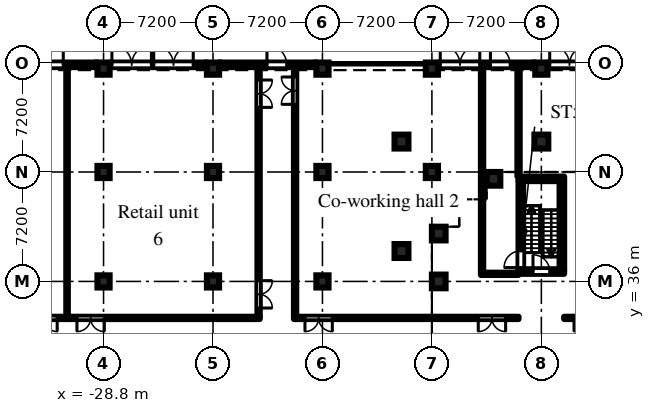
"""IFC4 building model, lengths in metres.
Left out: names, types, materials, properties, quantities, classifications, styles, units other than length and angle.
Written with IfcOpenShell. Run it as: python <this file> out.ifc"""

import sys

from ifc_helpers import new_model, si_unit, direction, frame, frame_2d, origin, origin_2d, place, context, subcontext, project, spatial, rectangle, hollow_circle, extrude, element, fill, save


model = new_model("IFC4")
c1 = context("Model", 3, precision=1e-05, world=origin(), true_north=direction((0.0, 1.0)))
c2 = subcontext(c1, "Body", "Model", "MODEL_VIEW")
j1 = project(units=[si_unit("LENGTHUNIT", "METRE"), si_unit("PLANEANGLEUNIT", "RADIAN")], contexts=[c1])
p1 = place(None, origin())
s1 = spatial("IfcSite", under=j1, at=p1, CompositionType="ELEMENT")
p2 = place(p1, origin())
s2 = spatial("IfcBuilding", under=s1, at=p2, CompositionType="ELEMENT")
p3 = place(p2, origin())
s3 = spatial("IfcBuildingStorey", under=s2, at=p3, CompositionType="ELEMENT", Elevation=0.0)
for number, where, z_axis, x_axis in (
    (1, (-6.75, 36.0, 0.0), (0.0, 0.0, 1.0), (1.0, 0.0, 0.0)),
    (2, (-6.75, 39.15, 0.0), (0.0, 0.0, 1.0), (1.0, 0.0, 0.0)),
    (3, (-3.15, 42.75, 0.0), (0.0, 0.0, 1.0), (1.0, 0.0, 0.0)),
):
    element("IfcColumn", number, at=place(p3, frame(where, z_axis=z_axis, x_axis=x_axis)), inside=s3, PredefinedType="COLUMN", context=c2, shape_type="SweptSolid", body=[
        extrude(rectangle(XDim=0.9, YDim=0.9, at=origin_2d()), origin(), (0.0, 0.0, 1.0), 7.2),
    ])
for number, where, z_axis, x_axis in (
    (4, (-28.8, 36.0, 0.0), (0.0, 0.0, 1.0), (1.0, 0.0, 0.0)),
    (5, (-28.8, 43.2, 0.0), (0.0, 0.0, 1.0), (1.0, 0.0, 0.0)),
    (6, (-28.8, 50.0, 0.0), (0.0, 0.0, 1.0), (1.0, 0.0, 0.0)),
    (7, (-21.6, 36.0, 0.0), (0.0, 0.0, 1.0), (1.0, 0.0, 0.0)),
    (8, (-21.6, 43.2, 0.0), (0.0, 0.0, 1.0), (1.0, 0.0, 0.0)),
    (9, (-21.6, 50.0, 0.0), (0.0, 0.0, 1.0), (1.0, 0.0, 0.0)),
    (10, (-14.4, 36.0, 0.0), (0.0, 0.0, 1.0), (1.0, 0.0, 0.0)),
    (11, (-14.4, 43.2, 0.0), (0.0, 0.0, 1.0), (1.0, 0.0, 0.0)),
    (12, (-14.4, 50.0, 0.0), (0.0, 0.0, 1.0), (1.0, 0.0, 0.0)),
    (13, (-7.2, 43.2, 0.0), (0.0, 0.0, 1.0), (1.0, 0.0, 0.0)),
    (14, (-7.2, 50.0, 0.0), (0.0, 0.0, 1.0), (1.0, 0.0, 0.0)),
    (15, (0.0, 50.0, 0.0), (0.0, 0.0, 1.0), (1.0, 0.0, 0.0)),
):
    element("IfcColumn", number, at=place(p3, frame(where, z_axis=z_axis, x_axis=x_axis)), inside=s3, PredefinedType="COLUMN", context=c2, shape_type="SweptSolid", body=[
        extrude(rectangle(XDim=0.8, YDim=0.8, at=origin_2d()), origin(), (0.0, 0.0, 1.0), 6.6),
    ])
for number, where, z_axis, x_axis in (
    (16, (0.0, 45.2, 0.0), (0.0, 0.0, 1.0), (1.0, 0.0, 0.0)),
    (17, (-9.2, 45.2, 0.0), (0.0, 0.0, 1.0), (1.0, 0.0, 0.0)),
    (18, (-9.2, 38.0, 0.0), (0.0, 0.0, 1.0), (1.0, 0.0, 0.0)),
):
    element("IfcColumn", number, at=place(p3, frame(where, z_axis=z_axis, x_axis=x_axis)), inside=s3, PredefinedType="COLUMN", context=c2, shape_type="SweptSolid", body=[
        extrude(hollow_circle(Radius=0.457, WallThickness=0.05, at=origin_2d()), origin(), (0.0, 0.0, 1.0), 7.5),
    ])
p4 = place(p3, frame((6.8, 50.25, 0.0), z_axis=(0.0, 0.0, 1.0), x_axis=(-1.0, 0.0, 0.0)))
e19 = element("IfcWall", 19, at=p4, inside=s3, PredefinedType="SOLIDWALL", context=c2, shape_type="SweptSolid", body=[
    extrude(rectangle(XDim=6.4, YDim=0.3, at=frame_2d((3.2, 0.0))), origin(), (0.0, 0.0, 1.0), 6.6),
])
p5 = place(p4, frame((3.65, 0.0, 0.0)))
e20 = element("IfcOpeningElement", 20, at=p5, cuts=e19, PredefinedType="OPENING", context=c2, shape_type="SweptSolid", body=[
    extrude(rectangle(XDim=2.6, YDim=2.4, at=frame_2d((1.3, 1.2))), frame((0.0, 0.16, 0.0), z_axis=(0.0, -1.0, 0.0), x_axis=(1.0, 0.0, 0.0)), (0.0, 0.0, 1.0), 0.32),
])
p6 = place(p3, frame((-0.4, 50.25, 0.0), z_axis=(0.0, 0.0, 1.0), x_axis=(-1.0, 0.0, 0.0)))
e21 = element("IfcWall", 21, at=p6, inside=s3, PredefinedType="SOLIDWALL", context=c2, shape_type="SweptSolid", body=[
    extrude(rectangle(XDim=6.4, YDim=0.3, at=frame_2d((3.2, 0.0))), origin(), (0.0, 0.0, 1.0), 6.6),
])
p7 = place(p6, frame((1.65, 0.0, 0.0)))
e22 = element("IfcOpeningElement", 22, at=p7, cuts=e21, PredefinedType="OPENING", context=c2, shape_type="SweptSolid", body=[
    extrude(rectangle(XDim=1.3, YDim=2.1, at=frame_2d((0.65, 1.05))), frame((0.0, 0.16, 0.0), z_axis=(0.0, -1.0, 0.0), x_axis=(1.0, 0.0, 0.0)), (0.0, 0.0, 1.0), 0.32),
])
p8 = place(p6, frame((3.65, 0.0, 0.0)))
e23 = element("IfcOpeningElement", 23, at=p8, cuts=e21, PredefinedType="OPENING", context=c2, shape_type="SweptSolid", body=[
    extrude(rectangle(XDim=2.6, YDim=2.4, at=frame_2d((1.3, 1.2))), frame((0.0, 0.16, 0.0), z_axis=(0.0, -1.0, 0.0), x_axis=(1.0, 0.0, 0.0)), (0.0, 0.0, 1.0), 0.32),
])
p9 = place(p3, frame((-14.8, 50.25, 0.0), z_axis=(0.0, 0.0, 1.0), x_axis=(-1.0, 0.0, 0.0)))
e24 = element("IfcWall", 24, at=p9, inside=s3, PredefinedType="SOLIDWALL", context=c2, shape_type="SweptSolid", body=[
    extrude(rectangle(XDim=6.4, YDim=0.3, at=frame_2d((3.2, 0.0))), origin(), (0.0, 0.0, 1.0), 6.6),
])
p10 = place(p9, frame((1.95, 0.0, 0.0)))
e25 = element("IfcOpeningElement", 25, at=p10, cuts=e24, PredefinedType="OPENING", context=c2, shape_type="SweptSolid", body=[
    extrude(rectangle(XDim=1.3, YDim=2.1, at=frame_2d((0.65, 1.05))), frame((0.0, 0.16, 0.0), z_axis=(0.0, -1.0, 0.0), x_axis=(1.0, 0.0, 0.0)), (0.0, 0.0, 1.0), 0.32),
])
p11 = place(p3, frame((-22.0, 50.25, 0.0), z_axis=(0.0, 0.0, 1.0), x_axis=(-1.0, 0.0, 0.0)))
e26 = element("IfcWall", 26, at=p11, inside=s3, PredefinedType="SOLIDWALL", context=c2, shape_type="SweptSolid", body=[
    extrude(rectangle(XDim=6.4, YDim=0.3, at=frame_2d((3.2, 0.0))), origin(), (0.0, 0.0, 1.0), 6.6),
])
p12 = place(p11, frame((0.9, 0.0, 0.0)))
e27 = element("IfcOpeningElement", 27, at=p12, cuts=e26, PredefinedType="OPENING", context=c2, shape_type="SweptSolid", body=[
    extrude(rectangle(XDim=2.6, YDim=2.4, at=frame_2d((1.3, 1.2))), frame((0.0, 0.16, 0.0), z_axis=(0.0, -1.0, 0.0), x_axis=(1.0, 0.0, 0.0)), (0.0, 0.0, 1.0), 0.32),
])
p13 = place(p11, frame((3.65, 0.0, 0.0)))
e28 = element("IfcOpeningElement", 28, at=p13, cuts=e26, PredefinedType="OPENING", context=c2, shape_type="SweptSolid", body=[
    extrude(rectangle(XDim=2.6, YDim=2.4, at=frame_2d((1.3, 1.2))), frame((0.0, 0.16, 0.0), z_axis=(0.0, -1.0, 0.0), x_axis=(1.0, 0.0, 0.0)), (0.0, 0.0, 1.0), 0.32),
])
p14 = place(p3, frame((-29.2, 50.25, 0.0), z_axis=(0.0, 0.0, 1.0), x_axis=(-1.0, 0.0, 0.0)))
e29 = element("IfcWall", 29, at=p14, inside=s3, PredefinedType="SOLIDWALL", context=c2, shape_type="SweptSolid", body=[
    extrude(rectangle(XDim=6.4, YDim=0.3, at=frame_2d((3.2, 0.0))), origin(), (0.0, 0.0, 1.0), 6.6),
])
p15 = place(p14, frame((2.25, 0.0, 0.0)))
e30 = element("IfcOpeningElement", 30, at=p15, cuts=e29, PredefinedType="OPENING", context=c2, shape_type="SweptSolid", body=[
    extrude(rectangle(XDim=2.6, YDim=2.4, at=frame_2d((1.3, 1.2))), frame((0.0, 0.16, 0.0), z_axis=(0.0, -1.0, 0.0), x_axis=(1.0, 0.0, 0.0)), (0.0, 0.0, 1.0), 0.32),
])
p16 = place(p3, frame((-1.5, 36.65, 0.0), z_axis=(0.0, 0.0, 1.0), x_axis=(1.0, 0.0, 0.0)))
e31 = element("IfcWall", 31, at=p16, inside=s3, PredefinedType="SHEAR", context=c2, shape_type="SweptSolid", body=[
    extrude(rectangle(XDim=3.0, YDim=0.3, at=frame_2d((1.5, 0.0))), origin(), (0.0, 0.0, 1.0), 6.6),
])
p17 = place(p16, frame((0.95, 0.0, 0.0)))
e32 = element("IfcOpeningElement", 32, at=p17, cuts=e31, PredefinedType="OPENING", context=c2, shape_type="SweptSolid", body=[
    extrude(rectangle(XDim=1.1, YDim=2.1, at=frame_2d((0.55, 1.05))), frame((0.0, 0.16, 0.0), z_axis=(0.0, -1.0, 0.0), x_axis=(1.0, 0.0, 0.0)), (0.0, 0.0, 1.0), 0.32),
])
p18 = place(p3, frame((-1.5, 42.75, 0.0), z_axis=(0.0, 0.0, 1.0), x_axis=(1.0, 0.0, 0.0)))
e33 = element("IfcWall", 33, at=p18, inside=s3, PredefinedType="SHEAR", context=c2, shape_type="SweptSolid", body=[
    extrude(rectangle(XDim=3.0, YDim=0.3, at=frame_2d((1.5, 0.0))), origin(), (0.0, 0.0, 1.0), 6.6),
])
p19 = place(p3, frame((-1.35, 36.8, 0.0), z_axis=(0.0, 0.0, 1.0), x_axis=(0.0, 1.0, 0.0)))
e34 = element("IfcWall", 34, at=p19, inside=s3, PredefinedType="SHEAR", context=c2, shape_type="SweptSolid", body=[
    extrude(rectangle(XDim=5.8, YDim=0.3, at=frame_2d((2.9, 0.0))), origin(), (0.0, 0.0, 1.0), 6.6),
])
p20 = place(p19, frame((0.11, 0.0, 0.0)))
e35 = element("IfcOpeningElement", 35, at=p20, cuts=e34, PredefinedType="OPENING", context=c2, shape_type="SweptSolid", body=[
    extrude(rectangle(XDim=1.1, YDim=2.1, at=frame_2d((0.55, 1.05))), frame((0.0, 0.16, 0.0), z_axis=(0.0, -1.0, 0.0), x_axis=(1.0, 0.0, 0.0)), (0.0, 0.0, 1.0), 0.32),
])
p21 = place(p3, frame((1.35, 36.8, 0.0), z_axis=(0.0, 0.0, 1.0), x_axis=(0.0, 1.0, 0.0)))
e36 = element("IfcWall", 36, at=p21, inside=s3, PredefinedType="SHEAR", context=c2, shape_type="SweptSolid", body=[
    extrude(rectangle(XDim=5.8, YDim=0.3, at=frame_2d((2.9, 0.0))), origin(), (0.0, 0.0, 1.0), 6.6),
])
p22 = place(p3, frame((-50.22, 33.6, 0.0), z_axis=(0.0, 0.0, 1.0), x_axis=(1.0, 0.0, 0.0)))
e37 = element("IfcWall", 37, at=p22, inside=s3, PredefinedType="PARTITIONING", context=c2, shape_type="SweptSolid", body=[
    extrude(rectangle(XDim=31.695, YDim=0.15, at=frame_2d((15.848, 0.0))), origin(), (0.0, 0.0, 1.0), 6.6),
])
p23 = place(p22, frame((0.67, 0.0, 0.0)))
e38 = element("IfcOpeningElement", 38, at=p23, cuts=e37, PredefinedType="OPENING", context=c2, shape_type="SweptSolid", body=[
    extrude(rectangle(XDim=2.4, YDim=2.1, at=frame_2d((1.2, 1.05))), frame((0.0, 0.085, 0.0), z_axis=(0.0, -1.0, 0.0), x_axis=(1.0, 0.0, 0.0)), (0.0, 0.0, 1.0), 0.17),
])
p24 = place(p22, frame((19.67, 0.0, 0.0)))
e39 = element("IfcOpeningElement", 39, at=p24, cuts=e37, PredefinedType="OPENING", context=c2, shape_type="SweptSolid", body=[
    extrude(rectangle(XDim=1.8, YDim=2.1, at=frame_2d((0.9, 1.05))), frame((0.0, 0.085, 0.0), z_axis=(0.0, -1.0, 0.0), x_axis=(1.0, 0.0, 0.0)), (0.0, 0.0, 1.0), 0.17),
])
p25 = place(p22, frame((4.27, 0.0, 0.0)))
e40 = element("IfcOpeningElement", 40, at=p25, cuts=e37, PredefinedType="OPENING", context=c2, shape_type="SweptSolid", body=[
    extrude(rectangle(XDim=1.8, YDim=2.1, at=frame_2d((0.9, 1.05))), frame((0.0, 0.085, 0.0), z_axis=(0.0, -1.0, 0.0), x_axis=(1.0, 0.0, 0.0)), (0.0, 0.0, 1.0), 0.17),
])
p26 = place(p22, frame((16.57, 0.0, 0.0)))
e41 = element("IfcOpeningElement", 41, at=p26, cuts=e37, PredefinedType="OPENING", context=c2, shape_type="SweptSolid", body=[
    extrude(rectangle(XDim=1.8, YDim=2.1, at=frame_2d((0.9, 1.05))), frame((0.0, 0.085, 0.0), z_axis=(0.0, -1.0, 0.0), x_axis=(1.0, 0.0, 0.0)), (0.0, 0.0, 1.0), 0.17),
])
p27 = place(p3, frame((-31.2, 33.675, 0.0), z_axis=(0.0, 0.0, 1.0), x_axis=(0.0, 1.0, 0.0)))
e42 = element("IfcWall", 42, at=p27, inside=s3, PredefinedType="PARTITIONING", context=c2, shape_type="SweptSolid", body=[
    extrude(rectangle(XDim=16.545, YDim=0.1, at=frame_2d((8.272, 0.0))), origin(), (0.0, 0.0, 1.0), 6.6),
])
p28 = place(p3, frame((-18.6, 33.675, 0.0), z_axis=(0.0, 0.0, 1.0), x_axis=(0.0, 1.0, 0.0)))
e43 = element("IfcWall", 43, at=p28, inside=s3, PredefinedType="PARTITIONING", context=c2, shape_type="SweptSolid", body=[
    extrude(rectangle(XDim=16.545, YDim=0.15, at=frame_2d((8.272, 0.0))), origin(), (0.0, 0.0, 1.0), 6.6),
])
p29 = place(p28, frame((0.575, 0.0, 0.0)))
e44 = element("IfcOpeningElement", 44, at=p29, cuts=e43, PredefinedType="OPENING", context=c2, shape_type="SweptSolid", body=[
    extrude(rectangle(XDim=1.8, YDim=2.1, at=frame_2d((0.9, 1.05))), frame((0.0, 0.085, 0.0), z_axis=(0.0, -1.0, 0.0), x_axis=(1.0, 0.0, 0.0)), (0.0, 0.0, 1.0), 0.17),
])
p30 = place(p28, frame((13.775, 0.0, 0.0)))
e45 = element("IfcOpeningElement", 45, at=p30, cuts=e43, PredefinedType="OPENING", context=c2, shape_type="SweptSolid", body=[
    extrude(rectangle(XDim=1.8, YDim=2.1, at=frame_2d((0.9, 1.05))), frame((0.0, 0.085, 0.0), z_axis=(0.0, -1.0, 0.0), x_axis=(1.0, 0.0, 0.0)), (0.0, 0.0, 1.0), 0.17),
])
p31 = place(p3, frame((-16.2, 33.525, 0.0), z_axis=(0.0, 0.0, 1.0), x_axis=(0.0, 1.0, 0.0)))
e46 = element("IfcWall", 46, at=p31, inside=s3, PredefinedType="PARTITIONING", context=c2, shape_type="SweptSolid", body=[
    extrude(rectangle(XDim=16.695, YDim=0.15, at=frame_2d((8.348, 0.0))), origin(), (0.0, 0.0, 1.0), 6.6),
])
p32 = place(p31, frame((14.125, 0.0, 0.0)))
e47 = element("IfcOpeningElement", 47, at=p32, cuts=e46, PredefinedType="OPENING", context=c2, shape_type="SweptSolid", body=[
    extrude(rectangle(XDim=1.8, YDim=2.1, at=frame_2d((0.9, 1.05))), frame((0.0, 0.085, 0.0), z_axis=(0.0, -1.0, 0.0), x_axis=(1.0, 0.0, 0.0)), (0.0, 0.0, 1.0), 0.17),
])
p33 = place(p3, frame((-16.125, 33.6, 0.0), z_axis=(0.0, 0.0, 1.0), x_axis=(1.0, 0.0, 0.0)))
e48 = element("IfcWall", 48, at=p33, inside=s3, PredefinedType="PARTITIONING", context=c2, shape_type="SweptSolid", body=[
    extrude(rectangle(XDim=14.625, YDim=0.15, at=frame_2d((7.312, 0.0))), origin(), (0.0, 0.0, 1.0), 6.6),
])
p34 = place(p33, frame((0.575, 0.0, 0.0)))
e49 = element("IfcOpeningElement", 49, at=p34, cuts=e48, PredefinedType="OPENING", context=c2, shape_type="SweptSolid", body=[
    extrude(rectangle(XDim=1.8, YDim=2.1, at=frame_2d((0.9, 1.05))), frame((0.0, 0.085, 0.0), z_axis=(0.0, -1.0, 0.0), x_axis=(1.0, 0.0, 0.0)), (0.0, 0.0, 1.0), 0.17),
])
p35 = place(p33, frame((11.975, 0.0, 0.0)))
e50 = element("IfcOpeningElement", 50, at=p35, cuts=e48, PredefinedType="OPENING", context=c2, shape_type="SweptSolid", body=[
    extrude(rectangle(XDim=1.8, YDim=2.1, at=frame_2d((0.9, 1.05))), frame((0.0, 0.085, 0.0), z_axis=(0.0, -1.0, 0.0), x_axis=(1.0, 0.0, 0.0)), (0.0, 0.0, 1.0), 0.17),
])
p36 = place(p3, frame((-3.9, 36.425, 0.0), z_axis=(0.0, 0.0, 1.0), x_axis=(0.0, 1.0, 0.0)))
e51 = element("IfcWall", 51, at=p36, inside=s3, PredefinedType="PARTITIONING", context=c2, shape_type="SweptSolid", body=[
    extrude(rectangle(XDim=13.795, YDim=0.15, at=frame_2d((6.897, 0.0))), origin(), (0.0, 0.0, 1.0), 6.6),
])
p37 = place(p3, frame((-3.825, 36.5, 0.0), z_axis=(0.0, 0.0, 1.0), x_axis=(1.0, 0.0, 0.0)))
e52 = element("IfcWall", 52, at=p37, inside=s3, PredefinedType="PARTITIONING", context=c2, shape_type="SweptSolid", body=[
    extrude(rectangle(XDim=2.325, YDim=0.15, at=frame_2d((1.163, 0.0))), origin(), (0.0, 0.0, 1.0), 6.6),
])
p38 = place(p3, frame((-1.5, 42.9, 0.0), z_axis=(0.0, 0.0, 1.0), x_axis=(0.0, 1.0, 0.0)))
e53 = element("IfcWall", 53, at=p38, inside=s3, PredefinedType="PARTITIONING", context=c2, shape_type="SweptSolid", body=[
    extrude(rectangle(XDim=7.32, YDim=0.15, at=frame_2d((3.66, 0.0))), origin(), (0.0, 0.0, 1.0), 6.6),
])
p39 = place(p3, frame((1.5, 33.6, 0.0), z_axis=(0.0, 0.0, 1.0), x_axis=(1.0, 0.0, 0.0)))
e54 = element("IfcWall", 54, at=p39, inside=s3, PredefinedType="PARTITIONING", context=c2, shape_type="SweptSolid", body=[
    extrude(rectangle(XDim=14.625, YDim=0.15, at=frame_2d((7.312, 0.0))), origin(), (0.0, 0.0, 1.0), 6.6),
])
p40 = place(p39, frame((0.65, 0.0, 0.0)))
e55 = element("IfcOpeningElement", 55, at=p40, cuts=e54, PredefinedType="OPENING", context=c2, shape_type="SweptSolid", body=[
    extrude(rectangle(XDim=1.8, YDim=2.1, at=frame_2d((0.9, 1.05))), frame((0.0, 0.085, 0.0), z_axis=(0.0, -1.0, 0.0), x_axis=(1.0, 0.0, 0.0)), (0.0, 0.0, 1.0), 0.17),
])
p41 = place(p5, frame((2.6, 0.0, 0.0), z_axis=(0.0, 0.0, 1.0), x_axis=(-1.0, 0.0, 0.0)))
e56 = element("IfcDoor", 56, at=p41, inside=s3, OperationType="DOUBLE_DOOR_DOUBLE_SWING", PredefinedType="DOOR", context=c2, shape_type="SweptSolid", body=[
    extrude(rectangle(XDim=2.6, YDim=2.4, at=frame_2d((1.3, 1.2))), frame((0.0, 0.025, 0.0), z_axis=(0.0, -1.0, 0.0), x_axis=(1.0, 0.0, 0.0)), (0.0, 0.0, 1.0), 0.05),
])
fill(e20, e56)
p42 = place(p7, frame((1.3, 0.0, 0.0), z_axis=(0.0, 0.0, 1.0), x_axis=(-1.0, 0.0, 0.0)))
e57 = element("IfcDoor", 57, at=p42, inside=s3, OperationType="SINGLE_SWING_LEFT", PredefinedType="DOOR", context=c2, shape_type="SweptSolid", body=[
    extrude(rectangle(XDim=1.3, YDim=2.1, at=frame_2d((0.65, 1.05))), frame((0.0, 0.025, 0.0), z_axis=(0.0, -1.0, 0.0), x_axis=(1.0, 0.0, 0.0)), (0.0, 0.0, 1.0), 0.05),
])
fill(e22, e57)
p43 = place(p8, frame((2.6, 0.0, 0.0), z_axis=(0.0, 0.0, 1.0), x_axis=(-1.0, 0.0, 0.0)))
e58 = element("IfcDoor", 58, at=p43, inside=s3, OperationType="DOUBLE_DOOR_DOUBLE_SWING", PredefinedType="DOOR", context=c2, shape_type="SweptSolid", body=[
    extrude(rectangle(XDim=2.6, YDim=2.4, at=frame_2d((1.3, 1.2))), frame((0.0, 0.025, 0.0), z_axis=(0.0, -1.0, 0.0), x_axis=(1.0, 0.0, 0.0)), (0.0, 0.0, 1.0), 0.05),
])
fill(e23, e58)
p44 = place(p10, frame((1.3, 0.0, 0.0), z_axis=(0.0, 0.0, 1.0), x_axis=(-1.0, 0.0, 0.0)))
e59 = element("IfcDoor", 59, at=p44, inside=s3, OperationType="SINGLE_SWING_LEFT", PredefinedType="DOOR", context=c2, shape_type="SweptSolid", body=[
    extrude(rectangle(XDim=1.3, YDim=2.1, at=frame_2d((0.65, 1.05))), frame((0.0, 0.025, 0.0), z_axis=(0.0, -1.0, 0.0), x_axis=(1.0, 0.0, 0.0)), (0.0, 0.0, 1.0), 0.05),
])
fill(e25, e59)
p45 = place(p12, frame((2.6, 0.0, 0.0), z_axis=(0.0, 0.0, 1.0), x_axis=(-1.0, 0.0, 0.0)))
e60 = element("IfcDoor", 60, at=p45, inside=s3, OperationType="DOUBLE_DOOR_DOUBLE_SWING", PredefinedType="DOOR", context=c2, shape_type="SweptSolid", body=[
    extrude(rectangle(XDim=2.6, YDim=2.4, at=frame_2d((1.3, 1.2))), frame((0.0, 0.025, 0.0), z_axis=(0.0, -1.0, 0.0), x_axis=(1.0, 0.0, 0.0)), (0.0, 0.0, 1.0), 0.05),
])
fill(e27, e60)
p46 = place(p13, frame((2.6, 0.0, 0.0), z_axis=(0.0, 0.0, 1.0), x_axis=(-1.0, 0.0, 0.0)))
e61 = element("IfcDoor", 61, at=p46, inside=s3, OperationType="DOUBLE_DOOR_DOUBLE_SWING", PredefinedType="DOOR", context=c2, shape_type="SweptSolid", body=[
    extrude(rectangle(XDim=2.6, YDim=2.4, at=frame_2d((1.3, 1.2))), frame((0.0, 0.025, 0.0), z_axis=(0.0, -1.0, 0.0), x_axis=(1.0, 0.0, 0.0)), (0.0, 0.0, 1.0), 0.05),
])
fill(e28, e61)
p47 = place(p15, frame((2.6, 0.0, 0.0), z_axis=(0.0, 0.0, 1.0), x_axis=(-1.0, 0.0, 0.0)))
e62 = element("IfcDoor", 62, at=p47, inside=s3, OperationType="DOUBLE_DOOR_DOUBLE_SWING", PredefinedType="DOOR", context=c2, shape_type="SweptSolid", body=[
    extrude(rectangle(XDim=2.6, YDim=2.4, at=frame_2d((1.3, 1.2))), frame((0.0, 0.025, 0.0), z_axis=(0.0, -1.0, 0.0), x_axis=(1.0, 0.0, 0.0)), (0.0, 0.0, 1.0), 0.05),
])
fill(e30, e62)
p48 = place(p17, origin())
e63 = element("IfcDoor", 63, at=p48, inside=s3, OperationType="SINGLE_SWING_LEFT", PredefinedType="DOOR", context=c2, shape_type="SweptSolid", body=[
    extrude(rectangle(XDim=1.1, YDim=2.1, at=frame_2d((0.55, 1.05))), frame((0.0, 0.025, 0.0), z_axis=(0.0, -1.0, 0.0), x_axis=(1.0, 0.0, 0.0)), (0.0, 0.0, 1.0), 0.05),
])
fill(e32, e63)
p49 = place(p20, origin())
e64 = element("IfcDoor", 64, at=p49, inside=s3, OperationType="SINGLE_SWING_LEFT", PredefinedType="DOOR", context=c2, shape_type="SweptSolid", body=[
    extrude(rectangle(XDim=1.1, YDim=2.1, at=frame_2d((0.55, 1.05))), frame((0.0, 0.025, 0.0), z_axis=(0.0, -1.0, 0.0), x_axis=(1.0, 0.0, 0.0)), (0.0, 0.0, 1.0), 0.05),
])
fill(e35, e64)
p50 = place(p40, frame((1.8, 0.0, 0.0), z_axis=(0.0, 0.0, 1.0), x_axis=(-1.0, 0.0, 0.0)))
e65 = element("IfcDoor", 65, at=p50, inside=s3, OperationType="DOUBLE_DOOR_DOUBLE_SWING", PredefinedType="DOOR", context=c2, shape_type="SweptSolid", body=[
    extrude(rectangle(XDim=1.8, YDim=2.1, at=frame_2d((0.9, 1.05))), frame((0.0, 0.025, 0.0), z_axis=(0.0, -1.0, 0.0), x_axis=(1.0, 0.0, 0.0)), (0.0, 0.0, 1.0), 0.05),
])
fill(e55, e65)
p51 = place(p32, origin())
e66 = element("IfcDoor", 66, at=p51, inside=s3, OperationType="DOUBLE_DOOR_DOUBLE_SWING", PredefinedType="DOOR", context=c2, shape_type="SweptSolid", body=[
    extrude(rectangle(XDim=1.8, YDim=2.1, at=frame_2d((0.9, 1.05))), frame((0.0, 0.025, 0.0), z_axis=(0.0, -1.0, 0.0), x_axis=(1.0, 0.0, 0.0)), (0.0, 0.0, 1.0), 0.05),
])
fill(e47, e66)
p52 = place(p34, frame((1.8, 0.0, 0.0), z_axis=(0.0, 0.0, 1.0), x_axis=(-1.0, 0.0, 0.0)))
e67 = element("IfcDoor", 67, at=p52, inside=s3, OperationType="DOUBLE_DOOR_DOUBLE_SWING", PredefinedType="DOOR", context=c2, shape_type="SweptSolid", body=[
    extrude(rectangle(XDim=1.8, YDim=2.1, at=frame_2d((0.9, 1.05))), frame((0.0, 0.025, 0.0), z_axis=(0.0, -1.0, 0.0), x_axis=(1.0, 0.0, 0.0)), (0.0, 0.0, 1.0), 0.05),
])
fill(e49, e67)
p53 = place(p35, frame((1.8, 0.0, 0.0), z_axis=(0.0, 0.0, 1.0), x_axis=(-1.0, 0.0, 0.0)))
e68 = element("IfcDoor", 68, at=p53, inside=s3, OperationType="DOUBLE_DOOR_DOUBLE_SWING", PredefinedType="DOOR", context=c2, shape_type="SweptSolid", body=[
    extrude(rectangle(XDim=1.8, YDim=2.1, at=frame_2d((0.9, 1.05))), frame((0.0, 0.025, 0.0), z_axis=(0.0, -1.0, 0.0), x_axis=(1.0, 0.0, 0.0)), (0.0, 0.0, 1.0), 0.05),
])
fill(e50, e68)
p54 = place(p24, frame((1.8, 0.0, 0.0), z_axis=(0.0, 0.0, 1.0), x_axis=(-1.0, 0.0, 0.0)))
e69 = element("IfcDoor", 69, at=p54, inside=s3, OperationType="DOUBLE_DOOR_DOUBLE_SWING", PredefinedType="DOOR", context=c2, shape_type="SweptSolid", body=[
    extrude(rectangle(XDim=1.8, YDim=2.1, at=frame_2d((0.9, 1.05))), frame((0.0, 0.025, 0.0), z_axis=(0.0, -1.0, 0.0), x_axis=(1.0, 0.0, 0.0)), (0.0, 0.0, 1.0), 0.05),
])
fill(e39, e69)
p55 = place(p29, frame((1.8, 0.0, 0.0), z_axis=(0.0, 0.0, 1.0), x_axis=(-1.0, 0.0, 0.0)))
e70 = element("IfcDoor", 70, at=p55, inside=s3, OperationType="DOUBLE_DOOR_DOUBLE_SWING", PredefinedType="DOOR", context=c2, shape_type="SweptSolid", body=[
    extrude(rectangle(XDim=1.8, YDim=2.1, at=frame_2d((0.9, 1.05))), frame((0.0, 0.025, 0.0), z_axis=(0.0, -1.0, 0.0), x_axis=(1.0, 0.0, 0.0)), (0.0, 0.0, 1.0), 0.05),
])
fill(e44, e70)
p56 = place(p30, frame((1.8, 0.0, 0.0), z_axis=(0.0, 0.0, 1.0), x_axis=(-1.0, 0.0, 0.0)))
e71 = element("IfcDoor", 71, at=p56, inside=s3, OperationType="DOUBLE_DOOR_DOUBLE_SWING", PredefinedType="DOOR", context=c2, shape_type="SweptSolid", body=[
    extrude(rectangle(XDim=1.8, YDim=2.1, at=frame_2d((0.9, 1.05))), frame((0.0, 0.025, 0.0), z_axis=(0.0, -1.0, 0.0), x_axis=(1.0, 0.0, 0.0)), (0.0, 0.0, 1.0), 0.05),
])
fill(e45, e71)
p57 = place(p26, frame((1.8, 0.0, 0.0), z_axis=(0.0, 0.0, 1.0), x_axis=(-1.0, 0.0, 0.0)))
e72 = element("IfcDoor", 72, at=p57, inside=s3, OperationType="DOUBLE_DOOR_DOUBLE_SWING", PredefinedType="DOOR", context=c2, shape_type="SweptSolid", body=[
    extrude(rectangle(XDim=1.8, YDim=2.1, at=frame_2d((0.9, 1.05))), frame((0.0, 0.025, 0.0), z_axis=(0.0, -1.0, 0.0), x_axis=(1.0, 0.0, 0.0)), (0.0, 0.0, 1.0), 0.05),
])
fill(e41, e72)
save(model, sys.argv[1])
